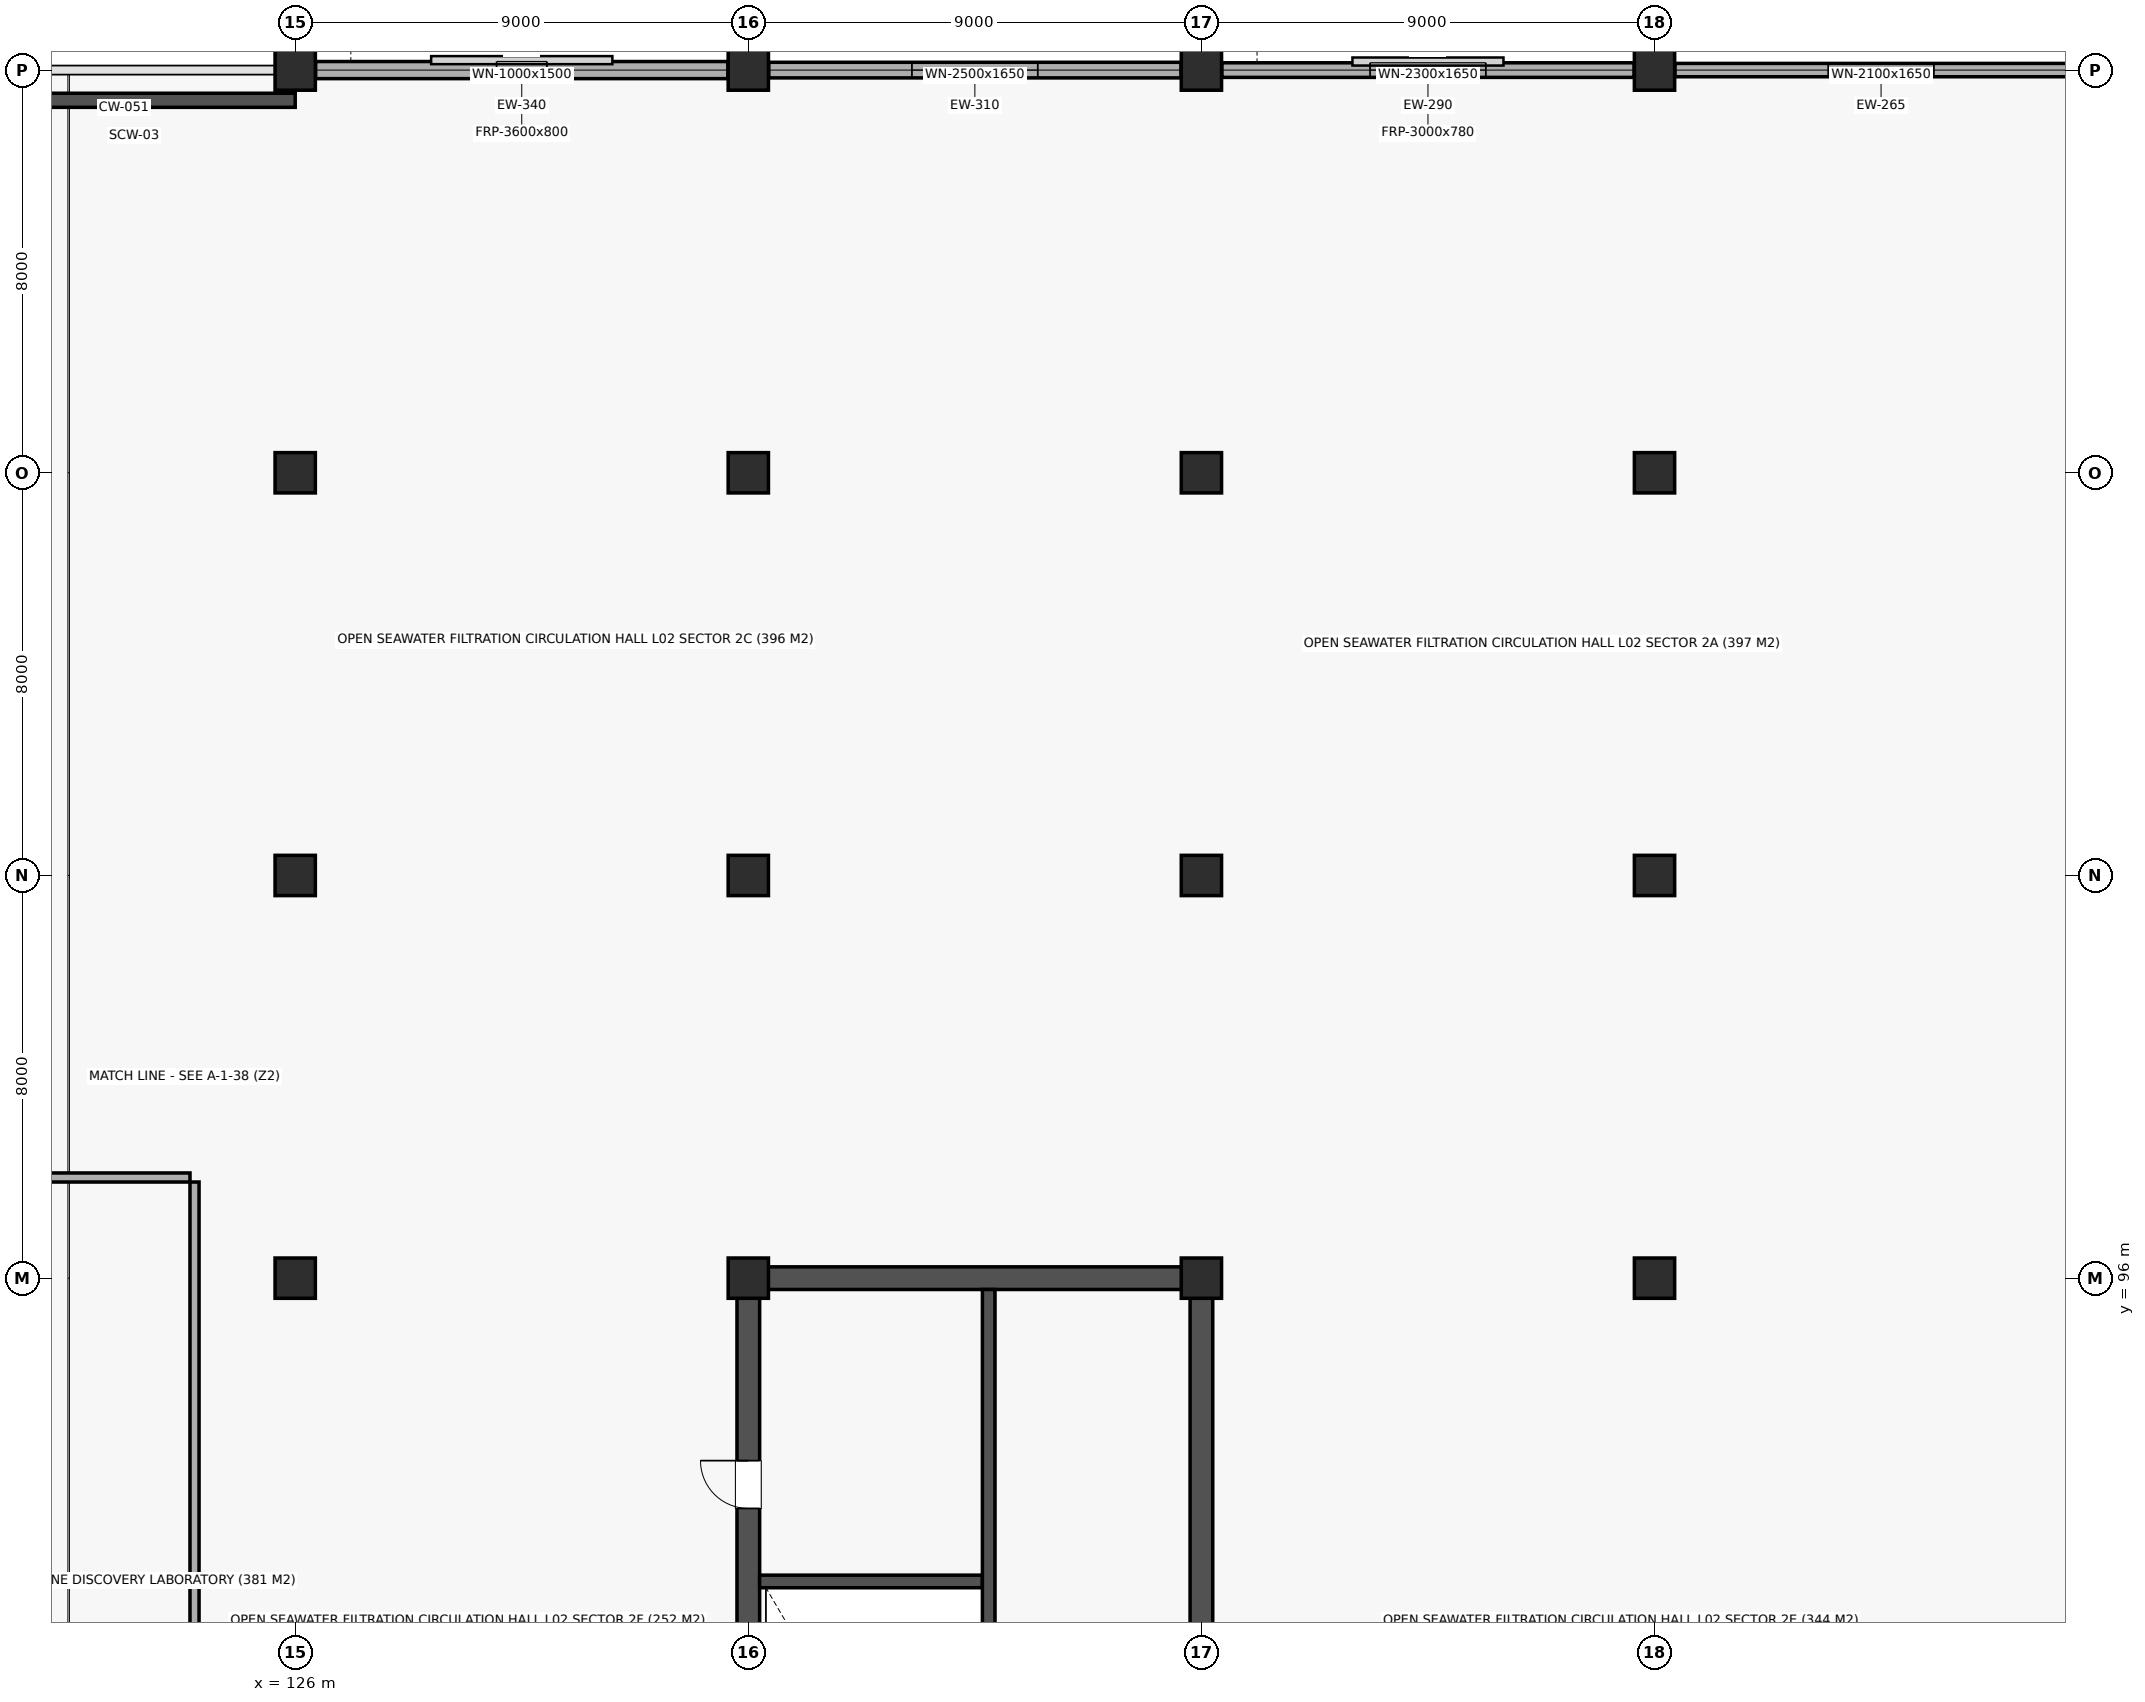
"""IFC4 building model, lengths in metres.
Left out: names, types, materials, properties, quantities, classifications, styles, units other than length and angle.
Written with IfcOpenShell. Run it as: python <this file> out.ifc"""

import sys

from ifc_helpers import new_model, si_unit, direction, frame, frame_2d, origin, origin_2d, place, context, subcontext, project, spatial, rectangle, extrude, element, fill, save


model = new_model("IFC4")
c1 = context("Model", 3, precision=1e-05, world=origin(), true_north=direction((0.0, 1.0)))
c2 = subcontext(c1, "Body", "Model", "MODEL_VIEW")
j1 = project(units=[si_unit("LENGTHUNIT", "METRE"), si_unit("PLANEANGLEUNIT", "RADIAN")], contexts=[c1])
p1 = place(None, origin())
s1 = spatial("IfcSite", under=j1, at=p1, CompositionType="ELEMENT")
p2 = place(p1, origin())
s2 = spatial("IfcBuilding", under=s1, at=p2, CompositionType="ELEMENT")
p3 = place(p2, frame((0.0, 0.0, 9.0)))
s3 = spatial("IfcBuildingStorey", under=s2, at=p3, CompositionType="ELEMENT", Elevation=9.0)
for number, where, z_axis, x_axis in (
    (1, (126.0, 96.0, 0.0), (0.0, 0.0, 1.0), (1.0, 0.0, 0.0)),
    (2, (126.0, 104.0, 0.0), (0.0, 0.0, 1.0), (1.0, 0.0, 0.0)),
    (3, (126.0, 112.0, 0.0), (0.0, 0.0, 1.0), (1.0, 0.0, 0.0)),
    (4, (126.0, 120.0, 0.0), (0.0, 0.0, 1.0), (1.0, 0.0, 0.0)),
    (5, (135.0, 96.0, 0.0), (0.0, 0.0, 1.0), (1.0, 0.0, 0.0)),
    (6, (135.0, 104.0, 0.0), (0.0, 0.0, 1.0), (1.0, 0.0, 0.0)),
    (7, (135.0, 112.0, 0.0), (0.0, 0.0, 1.0), (1.0, 0.0, 0.0)),
    (8, (135.0, 120.0, 0.0), (0.0, 0.0, 1.0), (1.0, 0.0, 0.0)),
    (9, (144.0, 96.0, 0.0), (0.0, 0.0, 1.0), (1.0, 0.0, 0.0)),
    (10, (144.0, 104.0, 0.0), (0.0, 0.0, 1.0), (1.0, 0.0, 0.0)),
    (11, (144.0, 112.0, 0.0), (0.0, 0.0, 1.0), (1.0, 0.0, 0.0)),
    (12, (144.0, 120.0, 0.0), (0.0, 0.0, 1.0), (1.0, 0.0, 0.0)),
    (13, (153.0, 96.0, 0.0), (0.0, 0.0, 1.0), (1.0, 0.0, 0.0)),
    (14, (153.0, 104.0, 0.0), (0.0, 0.0, 1.0), (1.0, 0.0, 0.0)),
    (15, (153.0, 112.0, 0.0), (0.0, 0.0, 1.0), (1.0, 0.0, 0.0)),
    (16, (153.0, 120.0, 0.0), (0.0, 0.0, 1.0), (1.0, 0.0, 0.0)),
):
    element("IfcColumn", number, at=place(p3, frame(where, z_axis=z_axis, x_axis=x_axis)), inside=s3, PredefinedType="COLUMN", context=c2, shape_type="SweptSolid", body=[
        extrude(rectangle(XDim=0.8, YDim=0.8, at=origin_2d()), origin(), (0.0, 0.0, 1.0), 4.5),
    ])
p4 = place(p3, frame((117.0, 119.4, 0.0), z_axis=(0.0, 0.0, 1.0), x_axis=(1.0, 0.0, 0.0)))
e17 = element("IfcWall", 17, at=p4, inside=s3, PredefinedType="SOLIDWALL", context=c2, shape_type="SweptSolid", body=[
    extrude(rectangle(XDim=9.0, YDim=0.28, at=frame_2d((4.5, 0.0))), origin(), (0.0, 0.0, 1.0), 4.14),
])
p5 = place(p3, frame((135.225, 96.0, 0.0), z_axis=(0.0, 0.0, 1.0), x_axis=(1.0, 0.0, 0.0)))
e18 = element("IfcWall", 18, at=p5, inside=s3, PredefinedType="SHEAR", context=c2, shape_type="SweptSolid", body=[
    extrude(rectangle(XDim=8.55, YDim=0.45, at=frame_2d((4.275, 0.0))), origin(), (0.0, 0.0, 1.0), 4.14),
])
p6 = place(p3, frame((135.0, 80.225, 0.0), z_axis=(0.0, 0.0, 1.0), x_axis=(0.0, 1.0, 0.0)))
e19 = element("IfcWall", 19, at=p6, inside=s3, PredefinedType="SHEAR", context=c2, shape_type="SweptSolid", body=[
    extrude(rectangle(XDim=15.55, YDim=0.45, at=frame_2d((7.775, 0.0))), origin(), (0.0, 0.0, 1.0), 4.14),
])
p7 = place(p6, frame((11.2, 0.0, 0.0)))
e20 = element("IfcOpeningElement", 20, at=p7, cuts=e19, PredefinedType="OPENING", context=c2, shape_type="SweptSolid", body=[
    extrude(rectangle(XDim=0.95, YDim=2.1, at=frame_2d((0.475, 1.05))), frame((0.0, 0.237, 0.0), z_axis=(0.0, -1.0, 0.0), x_axis=(1.0, 0.0, 0.0)), (0.0, 0.0, 1.0), 0.474),
])
p8 = place(p3, frame((144.0, 80.225, 0.0), z_axis=(0.0, 0.0, 1.0), x_axis=(0.0, 1.0, 0.0)))
e21 = element("IfcWall", 21, at=p8, inside=s3, PredefinedType="SHEAR", context=c2, shape_type="SweptSolid", body=[
    extrude(rectangle(XDim=15.55, YDim=0.45, at=frame_2d((7.775, 0.0))), origin(), (0.0, 0.0, 1.0), 4.14),
])
p9 = place(p3, frame((139.775, 80.225, 0.0), z_axis=(0.0, 0.0, 1.0), x_axis=(0.0, 1.0, 0.0)))
e22 = element("IfcWall", 22, at=p9, inside=s3, PredefinedType="SOLIDWALL", context=c2, shape_type="SweptSolid", body=[
    extrude(rectangle(XDim=15.55, YDim=0.25, at=frame_2d((7.775, 0.0))), origin(), (0.0, 0.0, 1.0), 4.14),
])
p10 = place(p9, frame((0.45, 0.0, 0.0)))
e23 = element("IfcOpeningElement", 23, at=p10, cuts=e22, PredefinedType="OPENING", context=c2, shape_type="SweptSolid", body=[
    extrude(rectangle(XDim=1.1, YDim=2.15, at=frame_2d((0.55, 1.075))), frame((0.0, 0.137, 0.0), z_axis=(0.0, -1.0, 0.0), x_axis=(1.0, 0.0, 0.0)), (0.0, 0.0, 1.0), 0.274),
])
p11 = place(p3, frame((135.225, 89.975, 0.0), z_axis=(0.0, 0.0, 1.0), x_axis=(1.0, 0.0, 0.0)))
e24 = element("IfcWall", 24, at=p11, inside=s3, PredefinedType="SOLIDWALL", context=c2, shape_type="SweptSolid", body=[
    extrude(rectangle(XDim=4.42, YDim=0.25, at=frame_2d((2.21, 0.0))), origin(), (0.0, 0.0, 1.0), 4.14),
])
p12 = place(p3, frame((126.405, 120.0, 0.0), z_axis=(0.0, 0.0, 1.0), x_axis=(1.0, 0.0, 0.0)))
e25 = element("IfcWall", 25, at=p12, inside=s3, PredefinedType="STANDARD", context=c2, shape_type="SweptSolid", body=[
    extrude(rectangle(XDim=8.19, YDim=0.34, at=frame_2d((4.095, 0.0))), origin(), (0.0, 0.0, 1.0), 3.42),
])
p13 = place(p12, frame((3.595, 0.0, 0.85)))
e26 = element("IfcOpeningElement", 26, at=p13, cuts=e25, PredefinedType="OPENING", context=c2, shape_type="SweptSolid", body=[
    extrude(rectangle(XDim=1.0, YDim=1.5, at=frame_2d((0.5, 0.75))), frame((0.0, 0.182, 0.0), z_axis=(0.0, -1.0, 0.0), x_axis=(1.0, 0.0, 0.0)), (0.0, 0.0, 1.0), 0.364),
])
p14 = place(p3, frame((135.405, 120.0, 0.0), z_axis=(0.0, 0.0, 1.0), x_axis=(1.0, 0.0, 0.0)))
e27 = element("IfcWall", 27, at=p14, inside=s3, PredefinedType="STANDARD", context=c2, shape_type="SweptSolid", body=[
    extrude(rectangle(XDim=8.19, YDim=0.31, at=frame_2d((4.095, 0.0))), origin(), (0.0, 0.0, 1.0), 3.42),
])
p15 = place(p14, frame((2.845, 0.0, 0.85)))
e28 = element("IfcOpeningElement", 28, at=p15, cuts=e27, PredefinedType="OPENING", context=c2, shape_type="SweptSolid", body=[
    extrude(rectangle(XDim=2.5, YDim=1.65, at=frame_2d((1.25, 0.825))), frame((0.0, 0.167, 0.0), z_axis=(0.0, -1.0, 0.0), x_axis=(1.0, 0.0, 0.0)), (0.0, 0.0, 1.0), 0.334),
])
p16 = place(p3, frame((144.405, 120.0, 0.0), z_axis=(0.0, 0.0, 1.0), x_axis=(1.0, 0.0, 0.0)))
e29 = element("IfcWall", 29, at=p16, inside=s3, PredefinedType="STANDARD", context=c2, shape_type="SweptSolid", body=[
    extrude(rectangle(XDim=8.19, YDim=0.29, at=frame_2d((4.095, 0.0))), origin(), (0.0, 0.0, 1.0), 3.42),
])
p17 = place(p16, frame((2.945, 0.0, 0.85)))
e30 = element("IfcOpeningElement", 30, at=p17, cuts=e29, PredefinedType="OPENING", context=c2, shape_type="SweptSolid", body=[
    extrude(rectangle(XDim=2.3, YDim=1.65, at=frame_2d((1.15, 0.825))), frame((0.0, 0.157, 0.0), z_axis=(0.0, -1.0, 0.0), x_axis=(1.0, 0.0, 0.0)), (0.0, 0.0, 1.0), 0.314),
])
p18 = place(p3, frame((153.405, 120.0, 0.0), z_axis=(0.0, 0.0, 1.0), x_axis=(1.0, 0.0, 0.0)))
e31 = element("IfcWall", 31, at=p18, inside=s3, PredefinedType="STANDARD", context=c2, shape_type="SweptSolid", body=[
    extrude(rectangle(XDim=8.19, YDim=0.265, at=frame_2d((4.095, 0.0))), origin(), (0.0, 0.0, 1.0), 3.42),
])
p19 = place(p18, frame((3.045, 0.0, 0.85)))
e32 = element("IfcOpeningElement", 32, at=p19, cuts=e31, PredefinedType="OPENING", context=c2, shape_type="SweptSolid", body=[
    extrude(rectangle(XDim=2.1, YDim=1.65, at=frame_2d((1.05, 0.825))), frame((0.0, 0.145, 0.0), z_axis=(0.0, -1.0, 0.0), x_axis=(1.0, 0.0, 0.0)), (0.0, 0.0, 1.0), 0.289),
])
p20 = place(p3, frame((99.59, 98.0, 0.0), z_axis=(0.0, 0.0, 1.0), x_axis=(1.0, 0.0, 0.0)))
e33 = element("IfcWall", 33, at=p20, inside=s3, PredefinedType="PARTITIONING", context=c2, shape_type="SweptSolid", body=[
    extrude(rectangle(XDim=24.32, YDim=0.18, at=frame_2d((12.16, 0.0))), origin(), (0.0, 0.0, 1.0), 4.14),
])
p21 = place(p3, frame((124.0, 82.09, 0.0), z_axis=(0.0, 0.0, 1.0), x_axis=(0.0, 1.0, 0.0)))
e34 = element("IfcWall", 34, at=p21, inside=s3, PredefinedType="PARTITIONING", context=c2, shape_type="SweptSolid", body=[
    extrude(rectangle(XDim=15.82, YDim=0.18, at=frame_2d((7.91, 0.0))), origin(), (0.0, 0.0, 1.0), 4.14),
])
p22 = place(p7, origin())
e35 = element("IfcDoor", 35, at=p22, inside=s3, OperationType="SINGLE_SWING_RIGHT", PredefinedType="DOOR", context=c2, shape_type="SweptSolid", body=[
    extrude(rectangle(XDim=0.95, YDim=2.1, at=frame_2d((0.475, 1.05))), frame((0.0, 0.025, 0.0), z_axis=(0.0, -1.0, 0.0), x_axis=(1.0, 0.0, 0.0)), (0.0, 0.0, 1.0), 0.05),
])
fill(e20, e35)
p23 = place(p13, origin())
e36 = element("IfcWindow", 36, at=p23, inside=s3, PartitioningType="SINGLE_PANEL", PredefinedType="WINDOW", context=c2, shape_type="SweptSolid", body=[
    extrude(rectangle(XDim=1.0, YDim=1.5, at=frame_2d((0.5, 0.75))), frame((0.0, 0.03, 0.0), z_axis=(0.0, -1.0, 0.0), x_axis=(1.0, 0.0, 0.0)), (0.0, 0.0, 1.0), 0.06),
])
fill(e26, e36)
p24 = place(p15, origin())
e37 = element("IfcWindow", 37, at=p24, inside=s3, PartitioningType="SINGLE_PANEL", PredefinedType="WINDOW", context=c2, shape_type="SweptSolid", body=[
    extrude(rectangle(XDim=2.5, YDim=1.65, at=frame_2d((1.25, 0.825))), frame((0.0, 0.03, 0.0), z_axis=(0.0, -1.0, 0.0), x_axis=(1.0, 0.0, 0.0)), (0.0, 0.0, 1.0), 0.06),
])
fill(e28, e37)
p25 = place(p17, origin())
e38 = element("IfcWindow", 38, at=p25, inside=s3, PartitioningType="SINGLE_PANEL", PredefinedType="WINDOW", context=c2, shape_type="SweptSolid", body=[
    extrude(rectangle(XDim=2.3, YDim=1.65, at=frame_2d((1.15, 0.825))), frame((0.0, 0.03, 0.0), z_axis=(0.0, -1.0, 0.0), x_axis=(1.0, 0.0, 0.0)), (0.0, 0.0, 1.0), 0.06),
])
fill(e30, e38)
p26 = place(p19, origin())
e39 = element("IfcWindow", 39, at=p26, inside=s3, PartitioningType="SINGLE_PANEL", PredefinedType="WINDOW", context=c2, shape_type="SweptSolid", body=[
    extrude(rectangle(XDim=2.1, YDim=1.65, at=frame_2d((1.05, 0.825))), frame((0.0, 0.03, 0.0), z_axis=(0.0, -1.0, 0.0), x_axis=(1.0, 0.0, 0.0)), (0.0, 0.0, 1.0), 0.06),
])
fill(e32, e39)
save(model, sys.argv[1])
